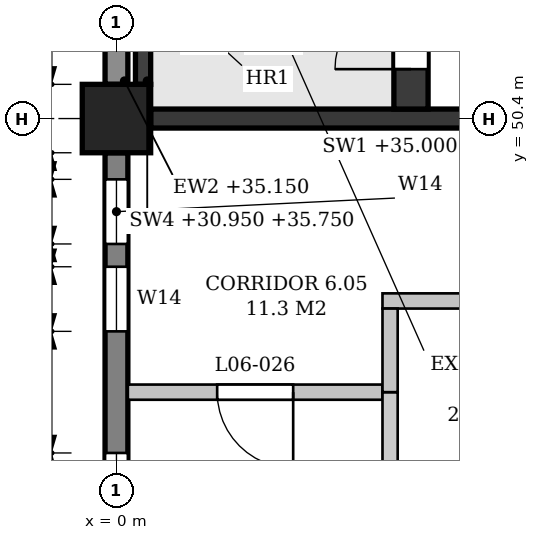
"""IFC4 building model, lengths in metres.
Left out: names, types, materials, properties, quantities, classifications, styles, units other than length and angle.
Written with IfcOpenShell. Run it as: python <this file> out.ifc"""

import sys

from ifc_helpers import new_model, si_unit, direction, frame, frame_2d, origin, origin_2d, place, context, subcontext, project, spatial, polyline, rectangle, outline, extrude, element, fill, save


model = new_model("IFC4")
c1 = context("Model", 3, precision=1e-05, world=origin(), true_north=direction((0.0, 1.0)))
c2 = subcontext(c1, "Body", "Model", "MODEL_VIEW")
j1 = project(units=[si_unit("LENGTHUNIT", "METRE"), si_unit("PLANEANGLEUNIT", "RADIAN")], contexts=[c1])
p1 = place(None, origin())
s1 = spatial("IfcSite", under=j1, at=p1, CompositionType="ELEMENT")
p2 = place(p1, origin())
s2 = spatial("IfcBuilding", under=s1, at=p2, CompositionType="ELEMENT")
p3 = place(p2, frame((0.0, 0.0, 31.2)))
s3 = spatial("IfcBuildingStorey", under=s2, at=p3, CompositionType="ELEMENT", Elevation=31.2)
p4 = place(p3, frame((0.0, 50.4, 0.0), z_axis=(0.0, 0.0, 1.0), x_axis=(1.0, 0.0, 0.0)))
e1 = element("IfcColumn", 1, at=p4, inside=s3, PredefinedType="COLUMN", context=c2, shape_type="SweptSolid", body=[
    extrude(rectangle(XDim=0.9, YDim=0.9, at=origin_2d()), origin(), (0.0, 0.0, 1.0), 4.8),
])
p5 = place(p3, frame((0.0, 43.65, 0.0), z_axis=(0.0, 0.0, 1.0), x_axis=(0.0, 1.0, 0.0)))
e2 = element("IfcWall", 2, at=p5, inside=s3, PredefinedType="STANDARD", context=c2, shape_type="SweptSolid", body=[
    extrude(rectangle(XDim=6.3, YDim=0.3, at=frame_2d((3.15, 0.0))), origin(), (0.0, 0.0, 1.0), 3.95),
])
p6 = place(p5, frame((0.35, 0.0, 0.9)))
e3 = element("IfcOpeningElement", 3, at=p6, cuts=e2, PredefinedType="OPENING", context=c2, shape_type="SweptSolid", body=[
    extrude(outline(polyline([(0.0, 0.0), (0.85, 0.0), (0.85, 2.05), (0.425, 2.5), (0.0, 2.05), (0.0, 0.0)])), frame((0.0, 0.16, 0.0), z_axis=(0.0, -1.0, 0.0), x_axis=(1.0, 0.0, 0.0)), (0.0, 0.0, 1.0), 0.32),
])
p7 = place(p5, frame((1.5, 0.0, 0.9)))
e4 = element("IfcOpeningElement", 4, at=p7, cuts=e2, PredefinedType="OPENING", context=c2, shape_type="SweptSolid", body=[
    extrude(outline(polyline([(0.0, 0.0), (0.85, 0.0), (0.85, 2.05), (0.425, 2.5), (0.0, 2.05), (0.0, 0.0)])), frame((0.0, 0.16, 0.0), z_axis=(0.0, -1.0, 0.0), x_axis=(1.0, 0.0, 0.0)), (0.0, 0.0, 1.0), 0.32),
])
p8 = place(p5, frame((3.95, 0.0, 0.9)))
e5 = element("IfcOpeningElement", 5, at=p8, cuts=e2, PredefinedType="OPENING", context=c2, shape_type="SweptSolid", body=[
    extrude(outline(polyline([(0.0, 0.0), (0.85, 0.0), (0.85, 2.05), (0.425, 2.5), (0.0, 2.05), (0.0, 0.0)])), frame((0.0, 0.16, 0.0), z_axis=(0.0, -1.0, 0.0), x_axis=(1.0, 0.0, 0.0)), (0.0, 0.0, 1.0), 0.32),
])
p9 = place(p5, frame((5.1, 0.0, 0.9)))
e6 = element("IfcOpeningElement", 6, at=p9, cuts=e2, PredefinedType="OPENING", context=c2, shape_type="SweptSolid", body=[
    extrude(outline(polyline([(0.0, 0.0), (0.85, 0.0), (0.85, 2.05), (0.425, 2.5), (0.0, 2.05), (0.0, 0.0)])), frame((0.0, 0.16, 0.0), z_axis=(0.0, -1.0, 0.0), x_axis=(1.0, 0.0, 0.0)), (0.0, 0.0, 1.0), 0.32),
])
p10 = place(p3, frame((0.0, 50.85, 0.0), z_axis=(0.0, 0.0, 1.0), x_axis=(0.0, 1.0, 0.0)))
e7 = element("IfcWall", 7, at=p10, inside=s3, PredefinedType="STANDARD", context=c2, shape_type="SweptSolid", body=[
    extrude(rectangle(XDim=6.3, YDim=0.3, at=frame_2d((3.15, 0.0))), origin(), (0.0, 0.0, 1.0), 3.95),
])
p11 = place(p10, frame((0.9, 0.0, 0.9)))
e8 = element("IfcOpeningElement", 8, at=p11, cuts=e7, PredefinedType="OPENING", context=c2, shape_type="SweptSolid", body=[
    extrude(outline(polyline([(0.0, 0.0), (0.9, 0.0), (0.9, 2.05), (0.45, 2.5), (0.0, 2.05), (0.0, 0.0)])), frame((0.0, 0.16, 0.0), z_axis=(0.0, -1.0, 0.0), x_axis=(1.0, 0.0, 0.0)), (0.0, 0.0, 1.0), 0.32),
])
p12 = place(p10, frame((4.5, 0.0, 0.9)))
e9 = element("IfcOpeningElement", 9, at=p12, cuts=e7, PredefinedType="OPENING", context=c2, shape_type="SweptSolid", body=[
    extrude(outline(polyline([(0.0, 0.0), (0.9, 0.0), (0.9, 2.05), (0.45, 2.5), (0.0, 2.05), (0.0, 0.0)])), frame((0.0, 0.16, 0.0), z_axis=(0.0, -1.0, 0.0), x_axis=(1.0, 0.0, 0.0)), (0.0, 0.0, 1.0), 0.32),
])
p13 = place(p3, frame((0.45, 50.4, 0.0), z_axis=(0.0, 0.0, 1.0), x_axis=(1.0, 0.0, 0.0)))
e10 = element("IfcWall", 10, at=p13, inside=s3, PredefinedType="SHEAR", context=c2, shape_type="SweptSolid", body=[
    extrude(rectangle(XDim=6.3, YDim=0.25, at=frame_2d((3.15, 0.0))), origin(), (0.0, 0.0, 1.0), 3.8),
])
p14 = place(p13, frame((4.8, 0.0, 0.0)))
e11 = element("IfcOpeningElement", 11, at=p14, cuts=e10, PredefinedType="OPENING", context=c2, shape_type="SweptSolid", body=[
    extrude(rectangle(XDim=1.1, YDim=2.1, at=frame_2d((0.55, 1.05))), frame((0.0, 0.135, 0.0), z_axis=(0.0, -1.0, 0.0), x_axis=(1.0, 0.0, 0.0)), (0.0, 0.0, 1.0), 0.27),
])
p15 = place(p3, frame((0.35, 50.85, -0.25), z_axis=(0.0, 0.0, 1.0), x_axis=(0.0, 1.0, 0.0)))
e12 = element("IfcWall", 12, at=p15, inside=s3, PredefinedType="SHEAR", context=c2, shape_type="SweptSolid", body=[
    extrude(rectangle(XDim=0.9, YDim=0.2, at=frame_2d((0.45, 0.0))), origin(), (0.0, 0.0, 1.0), 4.8),
])
p16 = place(p3, frame((3.875, 50.525, 0.0), z_axis=(0.0, 0.0, 1.0), x_axis=(0.0, 1.0, 0.0)))
e13 = element("IfcWall", 13, at=p16, inside=s3, PredefinedType="SHEAR", context=c2, shape_type="SweptSolid", body=[
    extrude(rectangle(XDim=6.85, YDim=0.45, at=frame_2d((3.425, 0.0))), origin(), (0.0, 0.0, 1.0), 4.55),
])
p17 = place(p16, frame((0.525, 0.0, 0.0)))
e14 = element("IfcOpeningElement", 14, at=p17, cuts=e13, PredefinedType="OPENING", context=c2, shape_type="SweptSolid", body=[
    extrude(rectangle(XDim=1.0, YDim=2.1, at=frame_2d((0.5, 1.05))), frame((0.0, 0.235, 0.0), z_axis=(0.0, -1.0, 0.0), x_axis=(1.0, 0.0, 0.0)), (0.0, 0.0, 1.0), 0.47),
])
p18 = place(p3, frame((0.15, 46.8, 0.0), z_axis=(0.0, 0.0, 1.0), x_axis=(1.0, 0.0, 0.0)))
e15 = element("IfcWall", 15, at=p18, inside=s3, PredefinedType="PARTITIONING", context=c2, shape_type="SweptSolid", body=[
    extrude(outline(polyline([(0.0, 0.0), (3.35, 0.0), (3.35, 4.55), (0.1, 4.55), (0.1, 3.95), (0.0, 3.95), (0.0, 0.0)])), frame((0.0, 0.1, 0.0), z_axis=(0.0, -1.0, 0.0), x_axis=(1.0, 0.0, 0.0)), (0.0, 0.0, 1.0), 0.2),
])
p19 = place(p18, frame((1.175, 0.0, 0.0)))
e16 = element("IfcOpeningElement", 16, at=p19, cuts=e15, PredefinedType="OPENING", context=c2, shape_type="SweptSolid", body=[
    extrude(rectangle(XDim=1.0, YDim=2.1, at=frame_2d((0.5, 1.05))), frame((0.0, 0.11, 0.0), z_axis=(0.0, -1.0, 0.0), x_axis=(1.0, 0.0, 0.0)), (0.0, 0.0, 1.0), 0.22),
])
p20 = place(p3, frame((3.5, 48.0, 0.0), z_axis=(0.0, 0.0, 1.0), x_axis=(1.0, 0.0, 0.0)))
e17 = element("IfcWall", 17, at=p20, inside=s3, PredefinedType="PARTITIONING", context=c2, shape_type="SweptSolid", body=[
    extrude(outline(polyline([(0.0, 0.0), (14.6, 0.0), (14.6, 4.55), (11.15, 4.55), (11.15, 3.8), (10.65, 3.8), (10.65, 4.55), (3.95, 4.55), (3.95, 3.8), (3.45, 3.8), (3.45, 4.55), (0.0, 4.55), (0.0, 0.0)])), frame((0.0, 0.1, 0.0), z_axis=(0.0, -1.0, 0.0), x_axis=(1.0, 0.0, 0.0)), (0.0, 0.0, 1.0), 0.2),
])
p21 = place(p20, frame((3.2, 0.0, 0.0)))
e18 = element("IfcOpeningElement", 18, at=p21, cuts=e17, PredefinedType="OPENING", context=c2, shape_type="SweptSolid", body=[
    extrude(rectangle(XDim=1.0, YDim=2.1, at=frame_2d((0.5, 1.05))), frame((0.0, 0.11, 0.0), z_axis=(0.0, -1.0, 0.0), x_axis=(1.0, 0.0, 0.0)), (0.0, 0.0, 1.0), 0.22),
])
p22 = place(p20, frame((8.6, 0.0, 0.0)))
e19 = element("IfcOpeningElement", 19, at=p22, cuts=e17, PredefinedType="OPENING", context=c2, shape_type="SweptSolid", body=[
    extrude(rectangle(XDim=1.0, YDim=2.1, at=frame_2d((0.5, 1.05))), frame((0.0, 0.11, 0.0), z_axis=(0.0, -1.0, 0.0), x_axis=(1.0, 0.0, 0.0)), (0.0, 0.0, 1.0), 0.22),
])
p23 = place(p3, frame((3.6, 36.15, 0.0), z_axis=(0.0, 0.0, 1.0), x_axis=(0.0, 1.0, 0.0)))
e20 = element("IfcWall", 20, at=p23, inside=s3, PredefinedType="PARTITIONING", context=c2, shape_type="SweptSolid", body=[
    extrude(outline(polyline([(0.0, 0.0), (10.65, 0.0), (10.65, 4.55), (7.3, 4.55), (7.3, 3.8), (6.8, 3.8), (6.8, 4.55), (0.1, 4.55), (0.1, 3.95), (0.0, 3.95), (0.0, 0.0)])), frame((0.0, 0.1, 0.0), z_axis=(0.0, -1.0, 0.0), x_axis=(1.0, 0.0, 0.0)), (0.0, 0.0, 1.0), 0.2),
])
p24 = place(p3, frame((3.6, 46.8, 0.0), z_axis=(0.0, 0.0, 1.0), x_axis=(0.0, 1.0, 0.0)))
e21 = element("IfcWall", 21, at=p24, inside=s3, PredefinedType="PARTITIONING", context=c2, shape_type="SweptSolid", body=[
    extrude(rectangle(XDim=1.1, YDim=0.2, at=frame_2d((0.55, 0.0))), origin(), (0.0, 0.0, 1.0), 4.55),
])
p25 = place(p7, origin())
e22 = element("IfcWindow", 22, at=p25, inside=s3, PartitioningType="SINGLE_PANEL", PredefinedType="WINDOW", context=c2, shape_type="SweptSolid", body=[
    extrude(outline(polyline([(0.0, 0.0), (0.85, 0.0), (0.85, 2.05), (0.425, 2.5), (0.0, 2.05), (0.0, 0.0)])), frame((0.0, 0.03, 0.0), z_axis=(0.0, -1.0, 0.0), x_axis=(1.0, 0.0, 0.0)), (0.0, 0.0, 1.0), 0.06),
])
fill(e4, e22)
p26 = place(p8, origin())
e23 = element("IfcWindow", 23, at=p26, inside=s3, PartitioningType="SINGLE_PANEL", PredefinedType="WINDOW", context=c2, shape_type="SweptSolid", body=[
    extrude(outline(polyline([(0.0, 0.0), (0.85, 0.0), (0.85, 2.05), (0.425, 2.5), (0.0, 2.05), (0.0, 0.0)])), frame((0.0, 0.03, 0.0), z_axis=(0.0, -1.0, 0.0), x_axis=(1.0, 0.0, 0.0)), (0.0, 0.0, 1.0), 0.06),
])
fill(e5, e23)
p27 = place(p9, origin())
e24 = element("IfcWindow", 24, at=p27, inside=s3, PartitioningType="SINGLE_PANEL", PredefinedType="WINDOW", context=c2, shape_type="SweptSolid", body=[
    extrude(outline(polyline([(0.0, 0.0), (0.85, 0.0), (0.85, 2.05), (0.425, 2.5), (0.0, 2.05), (0.0, 0.0)])), frame((0.0, 0.03, 0.0), z_axis=(0.0, -1.0, 0.0), x_axis=(1.0, 0.0, 0.0)), (0.0, 0.0, 1.0), 0.06),
])
fill(e6, e24)
p28 = place(p17, origin())
e25 = element("IfcDoor", 25, at=p28, inside=s3, OperationType="SINGLE_SWING_LEFT", PredefinedType="DOOR", context=c2, shape_type="SweptSolid", body=[
    extrude(rectangle(XDim=1.0, YDim=2.1, at=frame_2d((0.5, 1.05))), frame((0.0, 0.025, 0.0), z_axis=(0.0, -1.0, 0.0), x_axis=(1.0, 0.0, 0.0)), (0.0, 0.0, 1.0), 0.05),
])
fill(e14, e25)
p29 = place(p19, frame((1.0, 0.0, 0.0), z_axis=(0.0, 0.0, 1.0), x_axis=(-1.0, 0.0, 0.0)))
e26 = element("IfcDoor", 26, at=p29, inside=s3, OperationType="SINGLE_SWING_LEFT", PredefinedType="DOOR", context=c2, shape_type="SweptSolid", body=[
    extrude(rectangle(XDim=1.0, YDim=2.1, at=frame_2d((0.5, 1.05))), frame((0.0, 0.025, 0.0), z_axis=(0.0, -1.0, 0.0), x_axis=(1.0, 0.0, 0.0)), (0.0, 0.0, 1.0), 0.05),
])
fill(e16, e26)
save(model, sys.argv[1])
